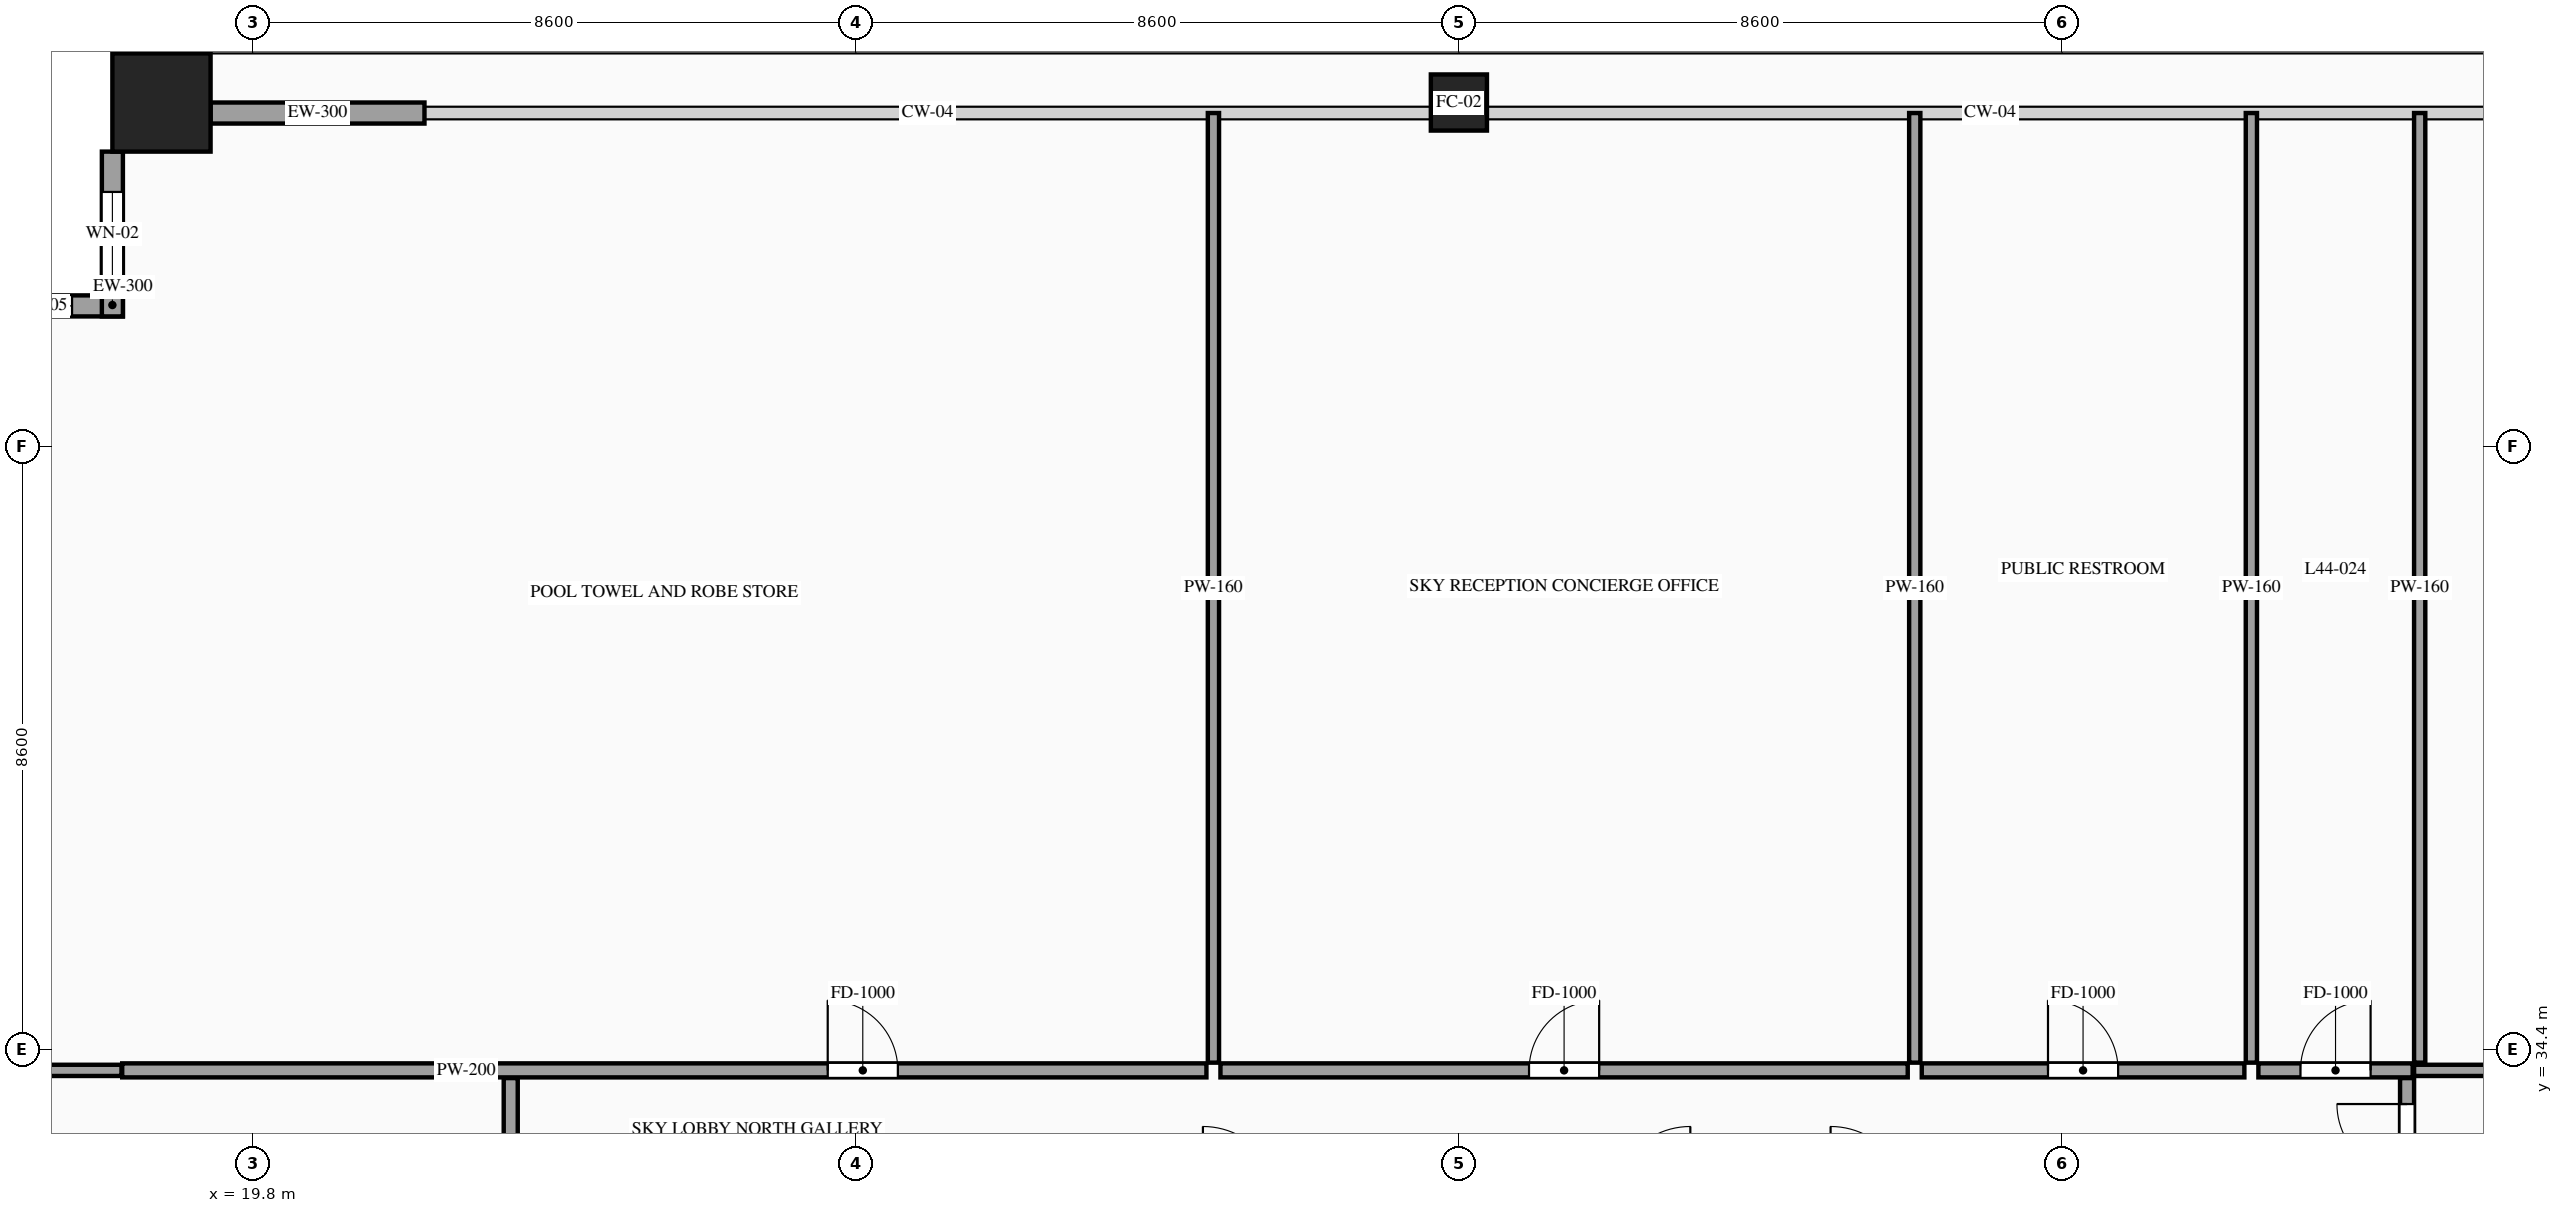
"""IFC4 building model, lengths in metres.
Left out: names, types, materials, properties, quantities, classifications, styles, units other than length and angle.
Written with IfcOpenShell. Run it as: python <this file> out.ifc"""

import sys

from ifc_helpers import new_model, si_unit, direction, frame, frame_2d, origin, origin_2d, place, context, subcontext, project, spatial, rectangle, hollow_rectangle, extrude, source, transform, mapped, element, fill, save


model = new_model("IFC4")
c1 = context("Model", 3, precision=1e-05, world=origin(), true_north=direction((0.0, 1.0)))
c2 = subcontext(c1, "Body", "Model", "MODEL_VIEW")
j1 = project(units=[si_unit("LENGTHUNIT", "METRE"), si_unit("PLANEANGLEUNIT", "RADIAN")], contexts=[c1])
p1 = place(None, origin())
s1 = spatial("IfcSite", under=j1, at=p1, CompositionType="ELEMENT")
p2 = place(p1, origin())
s2 = spatial("IfcBuilding", under=s1, at=p2, CompositionType="ELEMENT")
p3 = place(p2, frame((0.0, 0.0, 166.8)))
s3 = spatial("IfcBuildingStorey", under=s2, at=p3, CompositionType="ELEMENT", Elevation=166.8)
m1 = source(origin(), c2, "Body", "SweptSolid", [
    extrude(hollow_rectangle(XDim=1.4, YDim=1.4, WallThickness=0.06, at=origin_2d()), origin(), (0.0, 0.0, 1.0), 4.8),
])
p4 = place(p3, frame((18.5, 47.9, 0.0), z_axis=(0.0, 0.0, 1.0), x_axis=(1.0, 0.0, 0.0)))
e1 = element("IfcColumn", 1, at=p4, inside=s3, PredefinedType="COLUMN", context=c2, shape_type="MappedRepresentation", body=[
    mapped(m1, transform((0.0, 0.0, 0.0), scale=1.0)),
])
m2 = source(origin(), c2, "Body", "SweptSolid", [
    extrude(hollow_rectangle(XDim=0.8, YDim=0.8, WallThickness=0.036, at=origin_2d()), origin(), (0.0, 0.0, 1.0), 4.8),
])
p5 = place(p3, frame((37.0, 47.9, 0.0), z_axis=(0.0, 0.0, 1.0), x_axis=(1.0, 0.0, 0.0)))
e2 = element("IfcColumn", 2, at=p5, inside=s3, PredefinedType="COLUMN", context=c2, shape_type="MappedRepresentation", body=[
    mapped(m2, transform((0.0, 0.0, 0.0), scale=1.0)),
])
p6 = place(p3, frame((17.95, 45.0, 0.0), z_axis=(0.0, 0.0, 1.0), x_axis=(-1.0, 0.0, 0.0)))
e3 = element("IfcWall", 3, at=p6, inside=s3, PredefinedType="SOLIDWALL", context=c2, shape_type="SweptSolid", body=[
    extrude(rectangle(XDim=2.35, YDim=0.3, at=frame_2d((1.175, 0.0))), origin(), (0.0, 0.0, 1.0), 4.5),
])
p7 = place(p6, frame((0.725, 0.0, 0.85)))
e4 = element("IfcOpeningElement", 4, at=p7, cuts=e3, PredefinedType="OPENING", context=c2, shape_type="SweptSolid", body=[
    extrude(rectangle(XDim=0.9, YDim=1.5, at=frame_2d((0.45, 0.75))), frame((0.0, 0.165, 0.0), z_axis=(0.0, -1.0, 0.0), x_axis=(1.0, 0.0, 0.0)), (0.0, 0.0, 1.0), 0.33),
])
p8 = place(p3, frame((17.8, 47.2, 0.0), z_axis=(0.0, 0.0, 1.0), x_axis=(0.0, -1.0, 0.0)))
e5 = element("IfcWall", 5, at=p8, inside=s3, PredefinedType="SOLIDWALL", context=c2, shape_type="SweptSolid", body=[
    extrude(rectangle(XDim=2.35, YDim=0.3, at=frame_2d((1.175, 0.0))), origin(), (0.0, 0.0, 1.0), 4.5),
])
p9 = place(p8, frame((0.575, 0.0, 0.85)))
e6 = element("IfcOpeningElement", 6, at=p9, cuts=e5, PredefinedType="OPENING", context=c2, shape_type="SweptSolid", body=[
    extrude(rectangle(XDim=1.2, YDim=2.1, at=frame_2d((0.6, 1.05))), frame((0.0, 0.165, 0.0), z_axis=(0.0, -1.0, 0.0), x_axis=(1.0, 0.0, 0.0)), (0.0, 0.0, 1.0), 0.33),
])
m3 = source(origin(), c2, "Body", "SweptSolid", [
    extrude(rectangle(XDim=3.05, YDim=0.3, at=frame_2d((1.525, 0.0))), origin(), (0.0, 0.0, 1.0), 4.055),
])
p10 = place(p3, frame((19.2, 47.75, 0.0), z_axis=(0.0, 0.0, 1.0), x_axis=(1.0, 0.0, 0.0)))
e7 = element("IfcWall", 7, at=p10, inside=s3, PredefinedType="SOLIDWALL", context=c2, shape_type="MappedRepresentation", body=[
    mapped(m3, transform((0.0, 0.0, 0.0), scale=1.0)),
])
m4 = source(origin(), c2, "Body", "SweptSolid", [
    extrude(rectangle(XDim=1.74, YDim=0.2, at=frame_2d((0.87, 0.0))), origin(), (0.0, 0.0, 1.0), 4.5),
])
p11 = place(p3, frame((23.48, 32.25, 0.0), z_axis=(0.0, 0.0, 1.0), x_axis=(0.0, 1.0, 0.0)))
e8 = element("IfcWall", 8, at=p11, inside=s3, PredefinedType="PARTITIONING", context=c2, shape_type="MappedRepresentation", body=[
    mapped(m4, transform((0.0, 0.0, 0.0), scale=1.0)),
])
m5 = source(origin(), c2, "Body", "SweptSolid", [
    extrude(rectangle(XDim=2.88, YDim=0.16, at=frame_2d((1.44, 0.0))), origin(), (0.0, 0.0, 1.0), 4.5),
])
p12 = place(p3, frame((15.05, 34.1, 0.0), z_axis=(0.0, 0.0, 1.0), x_axis=(1.0, 0.0, 0.0)))
e9 = element("IfcWall", 9, at=p12, inside=s3, PredefinedType="PARTITIONING", context=c2, shape_type="MappedRepresentation", body=[
    mapped(m5, transform((0.0, 0.0, 0.0), scale=1.0)),
])
p13 = place(p3, frame((50.52, 32.25, 0.0), z_axis=(0.0, 0.0, 1.0), x_axis=(0.0, 1.0, 0.0)))
e10 = element("IfcWall", 10, at=p13, inside=s3, PredefinedType="PARTITIONING", context=c2, shape_type="SweptSolid", body=[
    extrude(rectangle(XDim=1.74, YDim=0.2, at=frame_2d((0.87, 0.0))), origin(), (0.0, 0.0, 1.0), 4.5),
])
p14 = place(p13, frame((0.37, 0.0, 0.0)))
e11 = element("IfcOpeningElement", 11, at=p14, cuts=e10, PredefinedType="OPENING", context=c2, shape_type="SweptSolid", body=[
    extrude(rectangle(XDim=1.0, YDim=2.2, at=frame_2d((0.5, 1.1))), frame((0.0, 0.115, 0.0), z_axis=(0.0, -1.0, 0.0), x_axis=(1.0, 0.0, 0.0)), (0.0, 0.0, 1.0), 0.23),
])
m6 = source(origin(), c2, "Body", "SweptSolid", [
    extrude(rectangle(XDim=8.33, YDim=0.16, at=frame_2d((4.165, 0.0))), origin(), (0.0, 0.0, 1.0), 4.5),
])
p15 = place(p3, frame((50.62, 34.1, 0.0), z_axis=(0.0, 0.0, 1.0), x_axis=(1.0, 0.0, 0.0)))
e12 = element("IfcWall", 12, at=p15, inside=s3, PredefinedType="PARTITIONING", context=c2, shape_type="MappedRepresentation", body=[
    mapped(m6, transform((0.0, 0.0, 0.0), scale=1.0)),
])
p16 = place(p3, frame((17.94, 34.1, 0.0), z_axis=(0.0, 0.0, 1.0), x_axis=(1.0, 0.0, 0.0)))
e13 = element("IfcWall", 13, at=p16, inside=s3, PredefinedType="PARTITIONING", context=c2, shape_type="SweptSolid", body=[
    extrude(rectangle(XDim=15.46, YDim=0.2, at=frame_2d((7.73, 0.0))), origin(), (0.0, 0.0, 1.0), 4.5),
])
p17 = place(p16, frame((10.06, 0.0, 0.0)))
e14 = element("IfcOpeningElement", 14, at=p17, cuts=e13, PredefinedType="OPENING", context=c2, shape_type="SweptSolid", body=[
    extrude(rectangle(XDim=1.0, YDim=2.2, at=frame_2d((0.5, 1.1))), frame((0.0, 0.115, 0.0), z_axis=(0.0, -1.0, 0.0), x_axis=(1.0, 0.0, 0.0)), (0.0, 0.0, 1.0), 0.23),
])
m7 = source(origin(), c2, "Body", "SweptSolid", [
    extrude(rectangle(XDim=13.54, YDim=0.16, at=frame_2d((6.77, 0.0))), origin(), (0.0, 0.0, 1.0), 4.5),
])
p18 = place(p3, frame((33.5, 34.21, 0.0), z_axis=(0.0, 0.0, 1.0), x_axis=(0.0, 1.0, 0.0)))
e15 = element("IfcWall", 15, at=p18, inside=s3, PredefinedType="PARTITIONING", context=c2, shape_type="MappedRepresentation", body=[
    mapped(m7, transform((0.0, 0.0, 0.0), scale=1.0)),
])
p19 = place(p3, frame((33.6, 34.1, 0.0), z_axis=(0.0, 0.0, 1.0), x_axis=(1.0, 0.0, 0.0)))
e16 = element("IfcWall", 16, at=p19, inside=s3, PredefinedType="PARTITIONING", context=c2, shape_type="SweptSolid", body=[
    extrude(rectangle(XDim=9.8, YDim=0.2, at=frame_2d((4.9, 0.0))), origin(), (0.0, 0.0, 1.0), 4.5),
])
p20 = place(p19, frame((4.4, 0.0, 0.0)))
e17 = element("IfcOpeningElement", 17, at=p20, cuts=e16, PredefinedType="OPENING", context=c2, shape_type="SweptSolid", body=[
    extrude(rectangle(XDim=1.0, YDim=2.2, at=frame_2d((0.5, 1.1))), frame((0.0, 0.115, 0.0), z_axis=(0.0, -1.0, 0.0), x_axis=(1.0, 0.0, 0.0)), (0.0, 0.0, 1.0), 0.23),
])
p21 = place(p3, frame((43.5, 34.21, 0.0), z_axis=(0.0, 0.0, 1.0), x_axis=(0.0, 1.0, 0.0)))
e18 = element("IfcWall", 18, at=p21, inside=s3, PredefinedType="PARTITIONING", context=c2, shape_type="MappedRepresentation", body=[
    mapped(m7, transform((0.0, 0.0, 0.0), scale=1.0)),
])
p22 = place(p3, frame((43.6, 34.1, 0.0), z_axis=(0.0, 0.0, 1.0), x_axis=(1.0, 0.0, 0.0)))
e19 = element("IfcWall", 19, at=p22, inside=s3, PredefinedType="PARTITIONING", context=c2, shape_type="SweptSolid", body=[
    extrude(rectangle(XDim=4.6, YDim=0.2, at=frame_2d((2.3, 0.0))), origin(), (0.0, 0.0, 1.0), 4.5),
])
p23 = place(p22, frame((1.8, 0.0, 0.0)))
e20 = element("IfcOpeningElement", 20, at=p23, cuts=e19, PredefinedType="OPENING", context=c2, shape_type="SweptSolid", body=[
    extrude(rectangle(XDim=1.0, YDim=2.2, at=frame_2d((0.5, 1.1))), frame((0.0, 0.115, 0.0), z_axis=(0.0, -1.0, 0.0), x_axis=(1.0, 0.0, 0.0)), (0.0, 0.0, 1.0), 0.23),
])
p24 = place(p3, frame((48.3, 34.21, 0.0), z_axis=(0.0, 0.0, 1.0), x_axis=(0.0, 1.0, 0.0)))
e21 = element("IfcWall", 21, at=p24, inside=s3, PredefinedType="PARTITIONING", context=c2, shape_type="MappedRepresentation", body=[
    mapped(m7, transform((0.0, 0.0, 0.0), scale=1.0)),
])
p25 = place(p3, frame((48.4, 34.1, 0.0), z_axis=(0.0, 0.0, 1.0), x_axis=(1.0, 0.0, 0.0)))
e22 = element("IfcWall", 22, at=p25, inside=s3, PredefinedType="PARTITIONING", context=c2, shape_type="SweptSolid", body=[
    extrude(rectangle(XDim=2.2, YDim=0.2, at=frame_2d((1.1, 0.0))), origin(), (0.0, 0.0, 1.0), 4.5),
])
p26 = place(p25, frame((0.6, 0.0, 0.0)))
e23 = element("IfcOpeningElement", 23, at=p26, cuts=e22, PredefinedType="OPENING", context=c2, shape_type="SweptSolid", body=[
    extrude(rectangle(XDim=1.0, YDim=2.2, at=frame_2d((0.5, 1.1))), frame((0.0, 0.115, 0.0), z_axis=(0.0, -1.0, 0.0), x_axis=(1.0, 0.0, 0.0)), (0.0, 0.0, 1.0), 0.23),
])
p27 = place(p3, frame((50.7, 34.21, 0.0), z_axis=(0.0, 0.0, 1.0), x_axis=(0.0, 1.0, 0.0)))
e24 = element("IfcWall", 24, at=p27, inside=s3, PredefinedType="PARTITIONING", context=c2, shape_type="MappedRepresentation", body=[
    mapped(m7, transform((0.0, 0.0, 0.0), scale=1.0)),
])
m8 = source(origin(), c2, "Body", "SweptSolid", [
    extrude(rectangle(XDim=0.9, YDim=1.5, at=frame_2d((0.45, 0.75))), frame((0.0, 0.03, 0.0), z_axis=(0.0, -1.0, 0.0), x_axis=(1.0, 0.0, 0.0)), (0.0, 0.0, 1.0), 0.06),
])
p28 = place(p7, origin())
e25 = element("IfcWindow", 25, at=p28, inside=s3, PartitioningType="SINGLE_PANEL", PredefinedType="WINDOW", context=c2, shape_type="MappedRepresentation", body=[
    mapped(m8, transform((0.0, 0.0, 0.0), scale=1.0)),
])
fill(e4, e25)
m9 = source(origin(), c2, "Body", "SweptSolid", [
    extrude(rectangle(XDim=1.2, YDim=2.1, at=frame_2d((0.6, 1.05))), frame((0.0, 0.03, 0.0), z_axis=(0.0, -1.0, 0.0), x_axis=(1.0, 0.0, 0.0)), (0.0, 0.0, 1.0), 0.06),
])
p29 = place(p9, origin())
e26 = element("IfcWindow", 26, at=p29, inside=s3, PartitioningType="SINGLE_PANEL", PredefinedType="WINDOW", context=c2, shape_type="MappedRepresentation", body=[
    mapped(m9, transform((0.0, 0.0, 0.0), scale=1.0)),
])
fill(e6, e26)
m10 = source(origin(), c2, "Body", "SweptSolid", [
    extrude(rectangle(XDim=1.0, YDim=2.2, at=frame_2d((0.5, 1.1))), frame((0.0, 0.025, 0.0), z_axis=(0.0, -1.0, 0.0), x_axis=(1.0, 0.0, 0.0)), (0.0, 0.0, 1.0), 0.05),
])
p30 = place(p14, origin())
e27 = element("IfcDoor", 27, at=p30, inside=s3, OperationType="SINGLE_SWING_RIGHT", PredefinedType="DOOR", context=c2, shape_type="MappedRepresentation", body=[
    mapped(m10, transform((0.0, 0.0, 0.0), scale=1.0)),
])
fill(e11, e27)
p31 = place(p17, origin())
e28 = element("IfcDoor", 28, at=p31, inside=s3, OperationType="SINGLE_SWING_LEFT", PredefinedType="DOOR", context=c2, shape_type="MappedRepresentation", body=[
    mapped(m10, transform((0.0, 0.0, 0.0), scale=1.0)),
])
fill(e14, e28)
p32 = place(p20, origin())
e29 = element("IfcDoor", 29, at=p32, inside=s3, OperationType="SINGLE_SWING_RIGHT", PredefinedType="DOOR", context=c2, shape_type="MappedRepresentation", body=[
    mapped(m10, transform((0.0, 0.0, 0.0), scale=1.0)),
])
fill(e17, e29)
p33 = place(p23, origin())
e30 = element("IfcDoor", 30, at=p33, inside=s3, OperationType="SINGLE_SWING_LEFT", PredefinedType="DOOR", context=c2, shape_type="MappedRepresentation", body=[
    mapped(m10, transform((0.0, 0.0, 0.0), scale=1.0)),
])
fill(e20, e30)
p34 = place(p26, origin())
e31 = element("IfcDoor", 31, at=p34, inside=s3, OperationType="SINGLE_SWING_RIGHT", PredefinedType="DOOR", context=c2, shape_type="MappedRepresentation", body=[
    mapped(m10, transform((0.0, 0.0, 0.0), scale=1.0)),
])
fill(e23, e31)
save(model, sys.argv[1])
